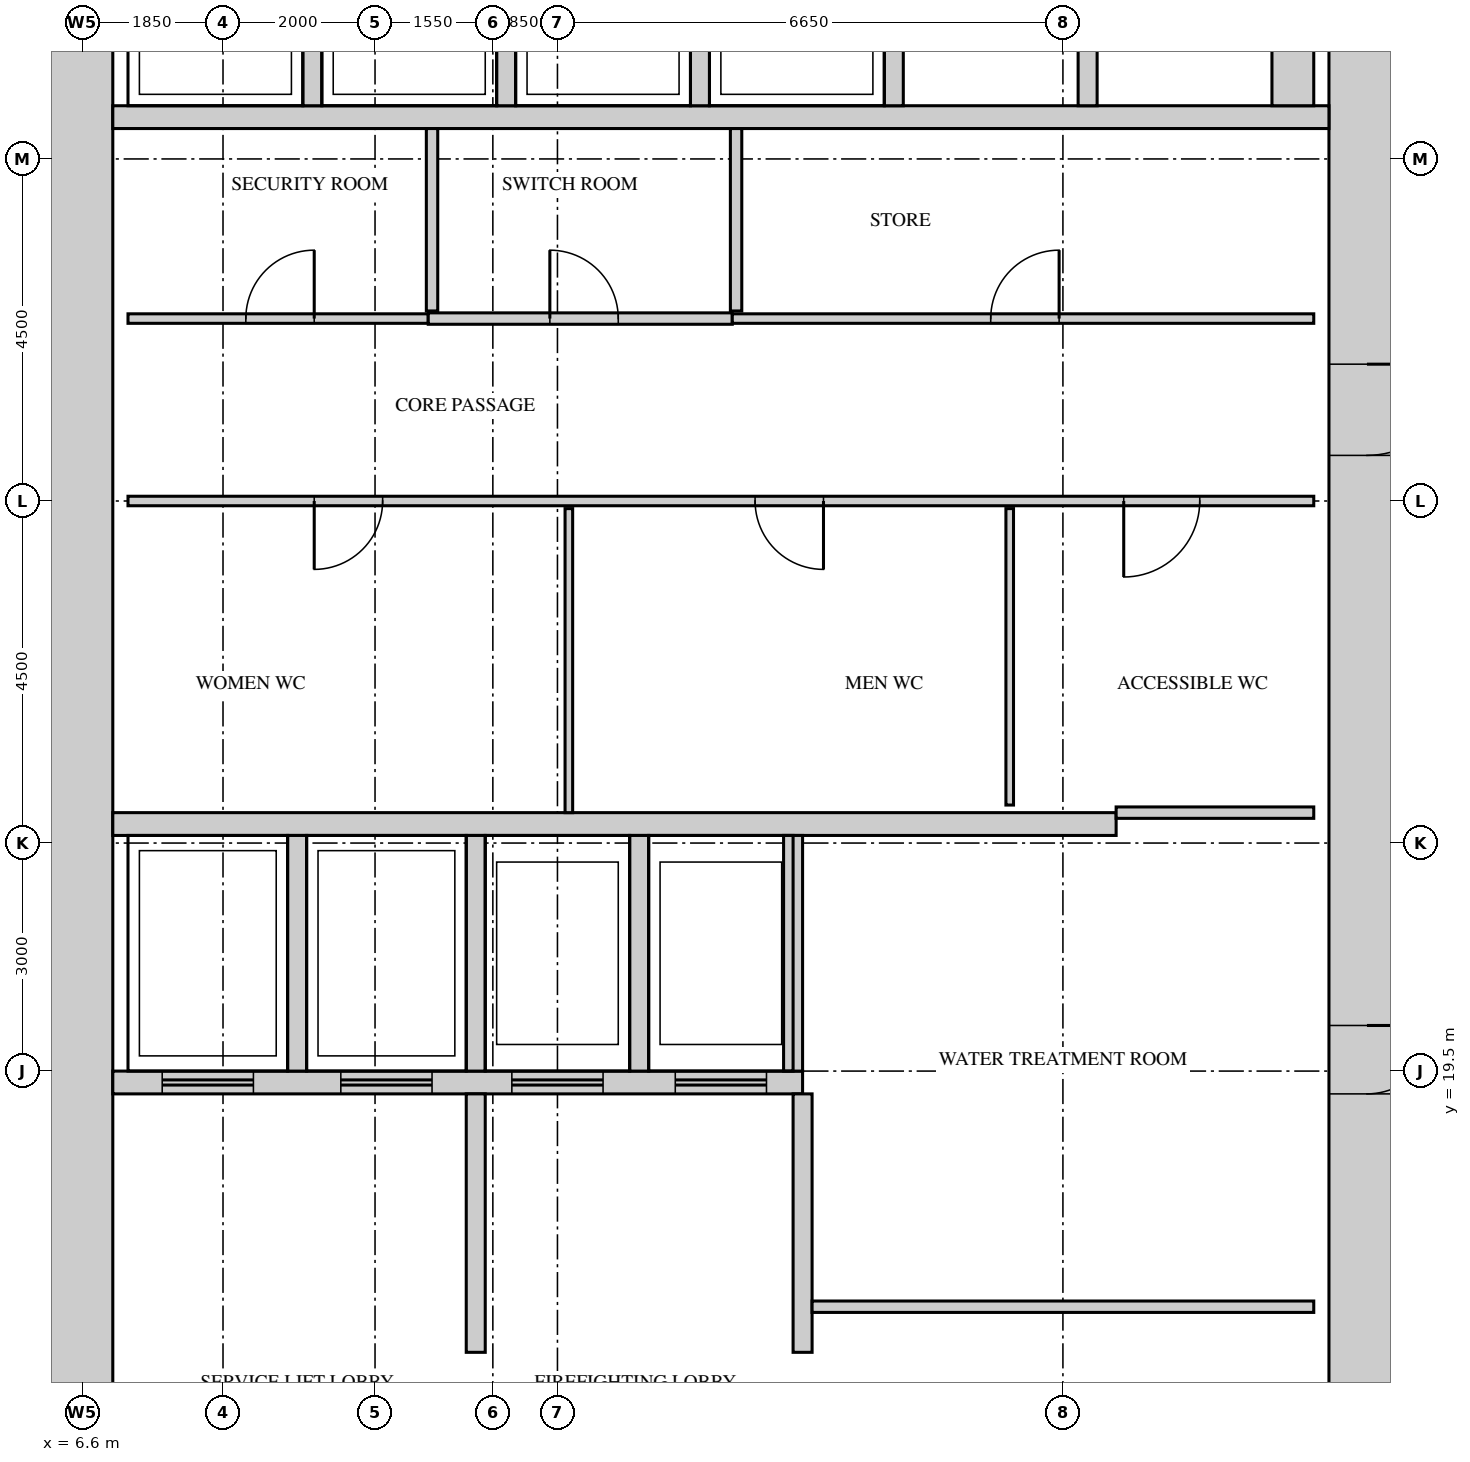
"""IFC4 building model, lengths in metres.
Left out: names, types, materials, properties, quantities, classifications, styles, units other than length and angle.
Written with IfcOpenShell. Run it as: python <this file> out.ifc"""

import sys

from ifc_helpers import new_model, si_unit, direction, frame, frame_2d, origin, place, context, subcontext, project, spatial, rectangle, extrude, source, transform, mapped, element, fill, save


model = new_model("IFC4")
c1 = context("Model", 3, precision=1e-05, world=origin(), true_north=direction((0.0, 1.0)))
c2 = subcontext(c1, "Body", "Model", "MODEL_VIEW")
j1 = project(units=[si_unit("LENGTHUNIT", "METRE"), si_unit("PLANEANGLEUNIT", "RADIAN")], contexts=[c1])
p1 = place(None, origin())
s1 = spatial("IfcSite", under=j1, at=p1, CompositionType="ELEMENT")
p2 = place(p1, origin())
s2 = spatial("IfcBuilding", under=s1, at=p2, CompositionType="ELEMENT")
p3 = place(p2, frame((0.0, 0.0, 149.9)))
s3 = spatial("IfcBuildingStorey", under=s2, at=p3, CompositionType="ELEMENT", Elevation=149.9)
m1 = source(origin(), c2, "Body", "SweptSolid", [
    extrude(rectangle(XDim=28.0, YDim=1.0, at=frame_2d((14.0, 0.0))), origin(), (0.0, 0.0, 1.0), 4.1),
])
p4 = place(p3, frame((23.5, 13.0, 0.0), z_axis=(0.0, 0.0, 1.0), x_axis=(0.0, 1.0, 0.0)))
e1 = element("IfcWall", 1, at=p4, inside=s3, PredefinedType="SHEAR", context=c2, shape_type="MappedRepresentation", body=[
    mapped(m1, transform((0.0, 0.0, 0.0))),
])
m2 = source(origin(), c2, "Body", "SweptSolid", [
    extrude(rectangle(XDim=1.8, YDim=2.1, at=frame_2d((0.9, 1.05))), frame((0.0, 0.51, 0.0), z_axis=(0.0, -1.0, 0.0), x_axis=(1.0, 0.0, 0.0)), (0.0, 0.0, 1.0), 1.02),
])
p5 = place(p4, frame((22.6, 0.0, 0.0)))
e2 = element("IfcOpeningElement", 2, at=p5, cuts=e1, PredefinedType="OPENING", context=c2, shape_type="MappedRepresentation", body=[
    mapped(m2, transform((0.0, 0.0, 0.0))),
])
m3 = source(origin(), c2, "Body", "SweptSolid", [
    extrude(rectangle(XDim=1.2, YDim=2.1, at=frame_2d((0.6, 1.05))), frame((0.0, 0.51, 0.0), z_axis=(0.0, -1.0, 0.0), x_axis=(1.0, 0.0, 0.0)), (0.0, 0.0, 1.0), 1.02),
])
p6 = place(p4, frame((14.6, 0.0, 0.0)))
e3 = element("IfcOpeningElement", 3, at=p6, cuts=e1, PredefinedType="OPENING", context=c2, shape_type="MappedRepresentation", body=[
    mapped(m3, transform((0.0, 0.0, 0.0))),
])
m4 = source(origin(), c2, "Body", "SweptSolid", [
    extrude(rectangle(XDim=0.9, YDim=2.1, at=frame_2d((0.45, 1.05))), frame((0.0, 0.51, 0.0), z_axis=(0.0, -1.0, 0.0), x_axis=(1.0, 0.0, 0.0)), (0.0, 0.0, 1.0), 1.02),
])
p7 = place(p4, frame((1.35, 0.0, 0.0)))
e4 = element("IfcOpeningElement", 4, at=p7, cuts=e1, PredefinedType="OPENING", context=c2, shape_type="MappedRepresentation", body=[
    mapped(m4, transform((0.0, 0.0, 0.0))),
])
p8 = place(p4, frame((6.2, 0.0, 0.0)))
e5 = element("IfcOpeningElement", 5, at=p8, cuts=e1, PredefinedType="OPENING", context=c2, shape_type="MappedRepresentation", body=[
    mapped(m4, transform((0.0, 0.0, 0.0))),
])
p9 = place(p3, frame((6.5, 13.0, 0.0), z_axis=(0.0, 0.0, 1.0), x_axis=(0.0, 1.0, 0.0)))
e6 = element("IfcWall", 6, at=p9, inside=s3, PredefinedType="SHEAR", context=c2, shape_type="MappedRepresentation", body=[
    mapped(m1, transform((0.0, 0.0, 0.0))),
])
m5 = source(origin(), c2, "Body", "SweptSolid", [
    extrude(rectangle(XDim=13.2, YDim=0.3, at=frame_2d((6.6, 0.0))), origin(), (0.0, 0.0, 1.0), 4.1),
])
p10 = place(p3, frame((7.0, 22.75, 0.0), z_axis=(0.0, 0.0, 1.0), x_axis=(1.0, 0.0, 0.0)))
e7 = element("IfcWall", 7, at=p10, inside=s3, PredefinedType="STANDARD", context=c2, shape_type="MappedRepresentation", body=[
    mapped(m5, transform((0.0, 0.0, 0.0))),
])
m6 = source(origin(), c2, "Body", "SweptSolid", [
    extrude(rectangle(XDim=9.075, YDim=0.3, at=frame_2d((4.538, 0.0))), origin(), (0.0, 0.0, 1.0), 4.1),
])
p11 = place(p3, frame((7.0, 19.35, 0.0), z_axis=(0.0, 0.0, 1.0), x_axis=(1.0, 0.0, 0.0)))
e8 = element("IfcWall", 8, at=p11, inside=s3, PredefinedType="STANDARD", context=c2, shape_type="MappedRepresentation", body=[
    mapped(m6, transform((0.0, 0.0, 0.0))),
])
m7 = source(origin(), c2, "Body", "SweptSolid", [
    extrude(rectangle(XDim=1.2, YDim=2.1, at=frame_2d((0.6, 1.05))), frame((0.0, 0.16, 0.0), z_axis=(0.0, -1.0, 0.0), x_axis=(1.0, 0.0, 0.0)), (0.0, 0.0, 1.0), 0.32),
])
p12 = place(p11, frame((0.65, 0.0, 0.0)))
e9 = element("IfcOpeningElement", 9, at=p12, cuts=e8, PredefinedType="OPENING", context=c2, shape_type="MappedRepresentation", body=[
    mapped(m7, transform((0.0, 0.0, 0.0))),
])
p13 = place(p11, frame((3.0, 0.0, 0.0)))
e10 = element("IfcOpeningElement", 10, at=p13, cuts=e8, PredefinedType="OPENING", context=c2, shape_type="MappedRepresentation", body=[
    mapped(m7, transform((0.0, 0.0, 0.0))),
])
p14 = place(p11, frame((5.25, 0.0, 0.0)))
e11 = element("IfcOpeningElement", 11, at=p14, cuts=e8, PredefinedType="OPENING", context=c2, shape_type="MappedRepresentation", body=[
    mapped(m7, transform((0.0, 0.0, 0.0))),
])
p15 = place(p11, frame((7.4, 0.0, 0.0)))
e12 = element("IfcOpeningElement", 12, at=p15, cuts=e8, PredefinedType="OPENING", context=c2, shape_type="MappedRepresentation", body=[
    mapped(m7, transform((0.0, 0.0, 0.0))),
])
m8 = source(origin(), c2, "Body", "SweptSolid", [
    extrude(rectangle(XDim=16.0, YDim=0.3, at=frame_2d((8.0, 0.0))), origin(), (0.0, 0.0, 1.0), 4.1),
])
p16 = place(p3, frame((7.0, 32.05, 0.0), z_axis=(0.0, 0.0, 1.0), x_axis=(1.0, 0.0, 0.0)))
e13 = element("IfcWall", 13, at=p16, inside=s3, PredefinedType="STANDARD", context=c2, shape_type="MappedRepresentation", body=[
    mapped(m8, transform((0.0, 0.0, 0.0))),
])
m9 = source(origin(), c2, "Body", "SweptSolid", [
    extrude(rectangle(XDim=3.1, YDim=0.25, at=frame_2d((1.55, 0.0))), origin(), (0.0, 0.0, 1.0), 4.1),
])
for number, where, z_axis, x_axis in (
    (14, (9.425, 19.5, 0.0), (0.0, 0.0, 1.0), (0.0, 1.0, 0.0)),
    (15, (11.775, 19.5, 0.0), (0.0, 0.0, 1.0), (0.0, 1.0, 0.0)),
    (16, (13.925, 19.5, 0.0), (0.0, 0.0, 1.0), (0.0, 1.0, 0.0)),
    (17, (15.95, 19.5, 0.0), (0.0, 0.0, 1.0), (0.0, 1.0, 0.0)),
):
    element("IfcWall", number, at=place(p3, frame(where, z_axis=z_axis, x_axis=x_axis)), inside=s3, PredefinedType="STANDARD", context=c2, shape_type="MappedRepresentation", body=[
        mapped(m9, transform((0.0, 0.0, 0.0))),
    ])
m10 = source(origin(), c2, "Body", "SweptSolid", [
    extrude(rectangle(XDim=2.4, YDim=0.25, at=frame_2d((1.2, 0.0))), origin(), (0.0, 0.0, 1.0), 4.1),
])
for number, where, z_axis, x_axis in (
    (18, (9.625, 32.2, 0.0), (0.0, 0.0, 1.0), (0.0, 1.0, 0.0)),
    (19, (12.175, 32.2, 0.0), (0.0, 0.0, 1.0), (0.0, 1.0, 0.0)),
    (20, (14.725, 32.2, 0.0), (0.0, 0.0, 1.0), (0.0, 1.0, 0.0)),
    (21, (17.275, 32.2, 0.0), (0.0, 0.0, 1.0), (0.0, 1.0, 0.0)),
    (22, (19.825, 32.2, 0.0), (0.0, 0.0, 1.0), (0.0, 1.0, 0.0)),
):
    element("IfcWall", number, at=place(p3, frame(where, z_axis=z_axis, x_axis=x_axis)), inside=s3, PredefinedType="STANDARD", context=c2, shape_type="MappedRepresentation", body=[
        mapped(m10, transform((0.0, 0.0, 0.0))),
    ])
m11 = source(origin(), c2, "Body", "SweptSolid", [
    extrude(rectangle(XDim=2.4, YDim=0.55, at=frame_2d((1.2, 0.0))), origin(), (0.0, 0.0, 1.0), 4.1),
])
p17 = place(p3, frame((22.525, 32.2, 0.0), z_axis=(0.0, 0.0, 1.0), x_axis=(0.0, 1.0, 0.0)))
e23 = element("IfcWall", 23, at=p17, inside=s3, PredefinedType="STANDARD", context=c2, shape_type="MappedRepresentation", body=[
    mapped(m11, transform((0.0, 0.0, 0.0))),
])
m12 = source(origin(), c2, "Body", "SweptSolid", [
    extrude(rectangle(XDim=3.4, YDim=0.25, at=frame_2d((1.7, 0.0))), origin(), (0.0, 0.0, 1.0), 4.1),
])
for number, where, z_axis, x_axis in (
    (24, (16.075, 15.8, 0.0), (0.0, 0.0, 1.0), (0.0, 1.0, 0.0)),
    (25, (11.775, 15.8, 0.0), (0.0, 0.0, 1.0), (0.0, 1.0, 0.0)),
):
    element("IfcWall", number, at=place(p3, frame(where, z_axis=z_axis, x_axis=x_axis)), inside=s3, PredefinedType="STANDARD", context=c2, shape_type="MappedRepresentation", body=[
        mapped(m12, transform((0.0, 0.0, 0.0))),
    ])
m13 = source(origin(), c2, "Body", "SweptSolid", [
    extrude(rectangle(XDim=6.6, YDim=0.15, at=frame_2d((3.3, 0.0))), origin(), (0.0, 0.0, 1.0), 4.2),
])
p18 = place(p3, frame((16.2, 16.4, 0.0), z_axis=(0.0, 0.0, 1.0), x_axis=(1.0, 0.0, 0.0)))
e26 = element("IfcWall", 26, at=p18, inside=s3, PredefinedType="PARTITIONING", context=c2, shape_type="MappedRepresentation", body=[
    mapped(m13, transform((0.0, 0.0, 0.0))),
])
m14 = source(origin(), c2, "Body", "SweptSolid", [
    extrude(rectangle(XDim=4.0, YDim=0.1, at=frame_2d((2.0, 0.0))), origin(), (0.0, 0.0, 1.0), 4.2),
])
p19 = place(p3, frame((13.0, 22.9, 0.0), z_axis=(0.0, 0.0, 1.0), x_axis=(0.0, 1.0, 0.0)))
e27 = element("IfcWall", 27, at=p19, inside=s3, PredefinedType="PARTITIONING", context=c2, shape_type="MappedRepresentation", body=[
    mapped(m14, transform((0.0, 0.0, 0.0))),
])
m15 = source(origin(), c2, "Body", "SweptSolid", [
    extrude(rectangle(XDim=2.6, YDim=0.15, at=frame_2d((1.3, 0.0))), origin(), (0.0, 0.0, 1.0), 4.2),
])
p20 = place(p3, frame((20.2, 22.9, 0.0), z_axis=(0.0, 0.0, 1.0), x_axis=(1.0, 0.0, 0.0)))
e28 = element("IfcWall", 28, at=p20, inside=s3, PredefinedType="PARTITIONING", context=c2, shape_type="MappedRepresentation", body=[
    mapped(m15, transform((0.0, 0.0, 0.0))),
])
m16 = source(origin(), c2, "Body", "SweptSolid", [
    extrude(rectangle(XDim=3.9, YDim=0.1, at=frame_2d((1.95, 0.0))), origin(), (0.0, 0.0, 1.0), 4.2),
])
p21 = place(p3, frame((18.8, 23.0, 0.0), z_axis=(0.0, 0.0, 1.0), x_axis=(0.0, 1.0, 0.0)))
e29 = element("IfcWall", 29, at=p21, inside=s3, PredefinedType="PARTITIONING", context=c2, shape_type="MappedRepresentation", body=[
    mapped(m16, transform((0.0, 0.0, 0.0))),
])
m17 = source(origin(), c2, "Body", "SweptSolid", [
    extrude(rectangle(XDim=15.6, YDim=0.125, at=frame_2d((7.8, 0.0))), origin(), (0.0, 0.0, 1.0), 4.2),
])
p22 = place(p3, frame((7.2, 27.0, 0.0), z_axis=(0.0, 0.0, 1.0), x_axis=(1.0, 0.0, 0.0)))
e30 = element("IfcWall", 30, at=p22, inside=s3, PredefinedType="PARTITIONING", context=c2, shape_type="MappedRepresentation", body=[
    mapped(m17, transform((0.0, 0.0, 0.0))),
])
m18 = source(origin(), c2, "Body", "SweptSolid", [
    extrude(rectangle(XDim=0.9, YDim=2.1, at=frame_2d((0.45, 1.05))), frame((0.0, 0.073, 0.0), z_axis=(0.0, -1.0, 0.0), x_axis=(1.0, 0.0, 0.0)), (0.0, 0.0, 1.0), 0.145),
])
p23 = place(p22, frame((2.45, 0.0, 0.0)))
e31 = element("IfcOpeningElement", 31, at=p23, cuts=e30, PredefinedType="OPENING", context=c2, shape_type="MappedRepresentation", body=[
    mapped(m18, transform((0.0, 0.0, 0.0))),
])
p24 = place(p22, frame((8.25, 0.0, 0.0)))
e32 = element("IfcOpeningElement", 32, at=p24, cuts=e30, PredefinedType="OPENING", context=c2, shape_type="MappedRepresentation", body=[
    mapped(m18, transform((0.0, 0.0, 0.0))),
])
m19 = source(origin(), c2, "Body", "SweptSolid", [
    extrude(rectangle(XDim=1.0, YDim=2.1, at=frame_2d((0.5, 1.05))), frame((0.0, 0.073, 0.0), z_axis=(0.0, -1.0, 0.0), x_axis=(1.0, 0.0, 0.0)), (0.0, 0.0, 1.0), 0.145),
])
p25 = place(p22, frame((13.1, 0.0, 0.0)))
e33 = element("IfcOpeningElement", 33, at=p25, cuts=e30, PredefinedType="OPENING", context=c2, shape_type="MappedRepresentation", body=[
    mapped(m19, transform((0.0, 0.0, 0.0))),
])
m20 = source(origin(), c2, "Body", "SweptSolid", [
    extrude(rectangle(XDim=3.95, YDim=0.125, at=frame_2d((1.975, 0.0))), origin(), (0.0, 0.0, 1.0), 4.2),
])
p26 = place(p3, frame((7.2, 29.4, 0.0), z_axis=(0.0, 0.0, 1.0), x_axis=(1.0, 0.0, 0.0)))
e34 = element("IfcWall", 34, at=p26, inside=s3, PredefinedType="PARTITIONING", context=c2, shape_type="MappedRepresentation", body=[
    mapped(m20, transform((0.0, 0.0, 0.0))),
])
p27 = place(p26, frame((1.55, 0.0, 0.0)))
e35 = element("IfcOpeningElement", 35, at=p27, cuts=e34, PredefinedType="OPENING", context=c2, shape_type="MappedRepresentation", body=[
    mapped(m18, transform((0.0, 0.0, 0.0))),
])
m21 = source(origin(), c2, "Body", "SweptSolid", [
    extrude(rectangle(XDim=4.0, YDim=0.15, at=frame_2d((2.0, 0.0))), origin(), (0.0, 0.0, 1.0), 4.2),
])
p28 = place(p3, frame((11.15, 29.4, 0.0), z_axis=(0.0, 0.0, 1.0), x_axis=(1.0, 0.0, 0.0)))
e36 = element("IfcWall", 36, at=p28, inside=s3, PredefinedType="PARTITIONING", context=c2, shape_type="MappedRepresentation", body=[
    mapped(m21, transform((0.0, 0.0, 0.0))),
])
m22 = source(origin(), c2, "Body", "SweptSolid", [
    extrude(rectangle(XDim=0.9, YDim=2.1, at=frame_2d((0.45, 1.05))), frame((0.0, 0.085, 0.0), z_axis=(0.0, -1.0, 0.0), x_axis=(1.0, 0.0, 0.0)), (0.0, 0.0, 1.0), 0.17),
])
p29 = place(p28, frame((1.6, 0.0, 0.0)))
e37 = element("IfcOpeningElement", 37, at=p29, cuts=e36, PredefinedType="OPENING", context=c2, shape_type="MappedRepresentation", body=[
    mapped(m22, transform((0.0, 0.0, 0.0))),
])
m23 = source(origin(), c2, "Body", "SweptSolid", [
    extrude(rectangle(XDim=7.65, YDim=0.125, at=frame_2d((3.825, 0.0))), origin(), (0.0, 0.0, 1.0), 4.2),
])
p30 = place(p3, frame((15.15, 29.4, 0.0), z_axis=(0.0, 0.0, 1.0), x_axis=(1.0, 0.0, 0.0)))
e38 = element("IfcWall", 38, at=p30, inside=s3, PredefinedType="PARTITIONING", context=c2, shape_type="MappedRepresentation", body=[
    mapped(m23, transform((0.0, 0.0, 0.0))),
])
p31 = place(p30, frame((3.4, 0.0, 0.0)))
e39 = element("IfcOpeningElement", 39, at=p31, cuts=e38, PredefinedType="OPENING", context=c2, shape_type="MappedRepresentation", body=[
    mapped(m18, transform((0.0, 0.0, 0.0))),
])
m24 = source(origin(), c2, "Body", "SweptSolid", [
    extrude(rectangle(XDim=2.4, YDim=0.15, at=frame_2d((1.2, 0.0))), origin(), (0.0, 0.0, 1.0), 4.2),
])
for number, where, z_axis, x_axis in (
    (40, (11.2, 29.5, 0.0), (0.0, 0.0, 1.0), (0.0, 1.0, 0.0)),
    (41, (15.2, 29.5, 0.0), (0.0, 0.0, 1.0), (0.0, 1.0, 0.0)),
):
    element("IfcWall", number, at=place(p3, frame(where, z_axis=z_axis, x_axis=x_axis)), inside=s3, PredefinedType="PARTITIONING", context=c2, shape_type="MappedRepresentation", body=[
        mapped(m24, transform((0.0, 0.0, 0.0))),
    ])
m25 = source(origin(), c2, "Body", "SweptSolid", [
    extrude(rectangle(XDim=1.2, YDim=2.1, at=frame_2d((0.6, 1.05))), frame((0.0, 0.45, 0.0), z_axis=(0.0, -1.0, 0.0), x_axis=(1.0, 0.0, 0.0)), (0.0, 0.0, 1.0), 0.9),
])
p32 = place(p6, origin())
e42 = element("IfcDoor", 42, at=p32, inside=s3, OperationType="SINGLE_SWING_RIGHT", PredefinedType="DOOR", context=c2, shape_type="MappedRepresentation", body=[
    mapped(m25, transform((0.0, 0.0, 0.0))),
])
fill(e3, e42)
m26 = source(origin(), c2, "Body", "SweptSolid", [
    extrude(rectangle(XDim=0.9, YDim=2.1, at=frame_2d((0.45, 1.05))), frame((0.0, 0.025, 0.0), z_axis=(0.0, -1.0, 0.0), x_axis=(1.0, 0.0, 0.0)), (0.0, 0.0, 1.0), 0.05),
])
p33 = place(p27, origin())
e43 = element("IfcDoor", 43, at=p33, inside=s3, OperationType="SINGLE_SWING_LEFT", PredefinedType="DOOR", context=c2, shape_type="MappedRepresentation", body=[
    mapped(m26, transform((0.0, 0.0, 0.0))),
])
fill(e35, e43)
p34 = place(p29, origin())
e44 = element("IfcDoor", 44, at=p34, inside=s3, OperationType="SINGLE_SWING_RIGHT", PredefinedType="DOOR", context=c2, shape_type="MappedRepresentation", body=[
    mapped(m26, transform((0.0, 0.0, 0.0))),
])
fill(e37, e44)
p35 = place(p31, origin())
e45 = element("IfcDoor", 45, at=p35, inside=s3, OperationType="SINGLE_SWING_LEFT", PredefinedType="DOOR", context=c2, shape_type="MappedRepresentation", body=[
    mapped(m26, transform((0.0, 0.0, 0.0))),
])
fill(e39, e45)
p36 = place(p23, origin())
e46 = element("IfcDoor", 46, at=p36, inside=s3, OperationType="SINGLE_SWING_LEFT", PredefinedType="DOOR", context=c2, shape_type="MappedRepresentation", body=[
    mapped(m26, transform((0.0, 0.0, 0.0))),
])
fill(e31, e46)
p37 = place(p24, origin())
e47 = element("IfcDoor", 47, at=p37, inside=s3, OperationType="SINGLE_SWING_RIGHT", PredefinedType="DOOR", context=c2, shape_type="MappedRepresentation", body=[
    mapped(m26, transform((0.0, 0.0, 0.0))),
])
fill(e32, e47)
m27 = source(origin(), c2, "Body", "SweptSolid", [
    extrude(rectangle(XDim=1.0, YDim=2.1, at=frame_2d((0.5, 1.05))), frame((0.0, 0.025, 0.0), z_axis=(0.0, -1.0, 0.0), x_axis=(1.0, 0.0, 0.0)), (0.0, 0.0, 1.0), 0.05),
])
p38 = place(p25, origin())
e48 = element("IfcDoor", 48, at=p38, inside=s3, OperationType="SINGLE_SWING_LEFT", PredefinedType="DOOR", context=c2, shape_type="MappedRepresentation", body=[
    mapped(m27, transform((0.0, 0.0, 0.0))),
])
fill(e33, e48)
m28 = source(origin(), c2, "Body", "SweptSolid", [
    extrude(rectangle(XDim=0.9, YDim=2.1, at=frame_2d((0.45, 1.05))), frame((0.0, 0.45, 0.0), z_axis=(0.0, -1.0, 0.0), x_axis=(1.0, 0.0, 0.0)), (0.0, 0.0, 1.0), 0.9),
])
p39 = place(p8, origin())
e49 = element("IfcDoor", 49, at=p39, inside=s3, OperationType="SINGLE_SWING_RIGHT", PredefinedType="DOOR", context=c2, shape_type="MappedRepresentation", body=[
    mapped(m28, transform((0.0, 0.0, 0.0))),
])
fill(e5, e49)
m29 = source(origin(), c2, "Body", "SweptSolid", [
    extrude(rectangle(XDim=1.2, YDim=2.1, at=frame_2d((0.6, 1.05))), frame((0.0, 0.025, 0.0), z_axis=(0.0, -1.0, 0.0), x_axis=(1.0, 0.0, 0.0)), (0.0, 0.0, 1.0), 0.05),
])
p40 = place(p12, origin())
e50 = element("IfcDoor", 50, at=p40, inside=s3, OperationType="DOUBLE_DOOR_SLIDING", PredefinedType="DOOR", context=c2, shape_type="MappedRepresentation", body=[
    mapped(m29, transform((0.0, 0.0, 0.0))),
])
fill(e9, e50)
p41 = place(p13, origin())
e51 = element("IfcDoor", 51, at=p41, inside=s3, OperationType="DOUBLE_DOOR_SLIDING", PredefinedType="DOOR", context=c2, shape_type="MappedRepresentation", body=[
    mapped(m29, transform((0.0, 0.0, 0.0))),
])
fill(e10, e51)
p42 = place(p14, origin())
e52 = element("IfcDoor", 52, at=p42, inside=s3, OperationType="DOUBLE_DOOR_SLIDING", PredefinedType="DOOR", context=c2, shape_type="MappedRepresentation", body=[
    mapped(m29, transform((0.0, 0.0, 0.0))),
])
fill(e11, e52)
p43 = place(p15, origin())
e53 = element("IfcDoor", 53, at=p43, inside=s3, OperationType="DOUBLE_DOOR_SLIDING", PredefinedType="DOOR", context=c2, shape_type="MappedRepresentation", body=[
    mapped(m29, transform((0.0, 0.0, 0.0))),
])
fill(e12, e53)
save(model, sys.argv[1])
